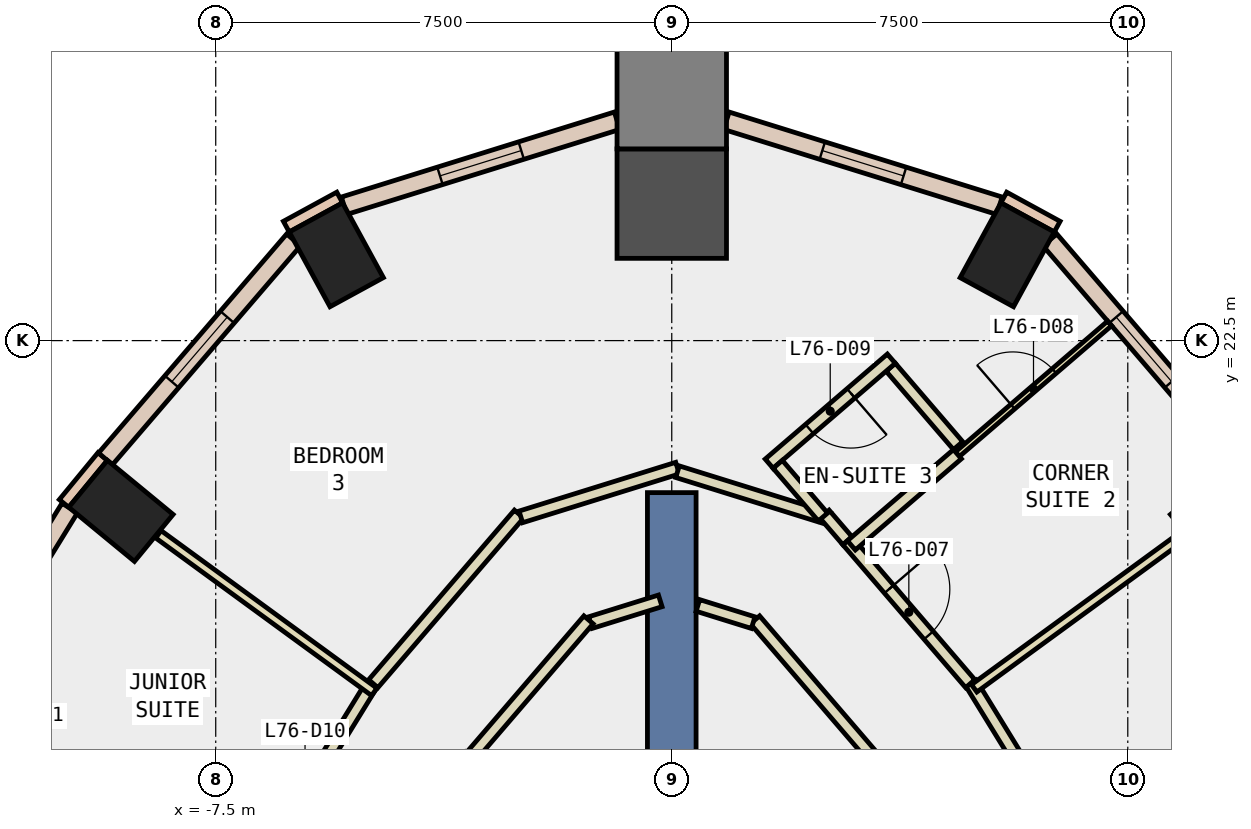
"""IFC4 building model, lengths in metres.
Left out: names, types, materials, properties, quantities, classifications, styles, units other than length and angle.
Written with IfcOpenShell. Run it as: python <this file> out.ifc"""

import sys

from ifc_helpers import new_model, si_unit, direction, frame, frame_2d, origin, origin_2d, place, context, subcontext, project, spatial, rectangle, extrude, element, fill, save


model = new_model("IFC4")
c1 = context("Model", 3, precision=1e-05, world=origin(), true_north=direction((0.0, 1.0)))
c2 = subcontext(c1, "Body", "Model", "MODEL_VIEW")
j1 = project(units=[si_unit("LENGTHUNIT", "METRE"), si_unit("PLANEANGLEUNIT", "RADIAN")], contexts=[c1])
p1 = place(None, origin())
s1 = spatial("IfcSite", under=j1, at=p1, CompositionType="ELEMENT")
p2 = place(p1, origin())
s2 = spatial("IfcBuilding", under=s1, at=p2, CompositionType="ELEMENT")
p3 = place(p2, frame((0.0, 0.0, 322.4)))
s3 = spatial("IfcBuildingStorey", under=s2, at=p3, CompositionType="ELEMENT", Elevation=322.4)
for number, where, z_axis, x_axis in (
    (1, (9.059, 19.7, -0.34), (0.0, 0.0, 1.0), (-0.636, 0.772, 0.0)),
    (2, (5.517, 23.911, -0.34), (0.0, 0.0, 1.0), (-0.878, 0.479, 0.0)),
):
    element("IfcColumn", number, at=place(p3, frame(where, z_axis=z_axis, x_axis=x_axis)), inside=s3, PredefinedType="COLUMN", context=c2, shape_type="SweptSolid", body=[
        extrude(rectangle(XDim=1.0, YDim=1.4, at=origin_2d()), origin(), (0.0, 0.0, 1.0), 3.34),
    ])
p4 = place(p3, frame((0.0, 24.753, -0.34), z_axis=(0.0, 0.0, 1.0), x_axis=(0.0, 1.0, 0.0)))
e3 = element("IfcColumn", 3, at=p4, inside=s3, PredefinedType="COLUMN", context=c2, shape_type="SweptSolid", body=[
    extrude(rectangle(XDim=1.8, YDim=1.8, at=origin_2d()), origin(), (0.0, 0.0, 1.0), 3.34),
])
for number, where, z_axis, x_axis in (
    (4, (-5.517, 23.911, -0.34), (0.0, 0.0, 1.0), (0.878, 0.479, 0.0)),
    (5, (-9.059, 19.7, -0.34), (0.0, 0.0, 1.0), (0.636, 0.772, 0.0)),
):
    element("IfcColumn", number, at=place(p3, frame(where, z_axis=z_axis, x_axis=x_axis)), inside=s3, PredefinedType="COLUMN", context=c2, shape_type="SweptSolid", body=[
        extrude(rectangle(XDim=1.0, YDim=1.4, at=origin_2d()), origin(), (0.0, 0.0, 1.0), 3.34),
    ])
p5 = place(p3, frame((0.0, 26.553, -0.34), z_axis=(0.0, 0.0, 1.0), x_axis=(0.0, 1.0, 0.0)))
e6 = element("IfcColumn", 6, at=p5, inside=s3, PredefinedType="COLUMN", context=c2, shape_type="SweptSolid", body=[
    extrude(rectangle(XDim=1.8, YDim=1.8, at=origin_2d()), origin(), (0.0, 0.0, 1.0), 3.34),
])
p6 = place(p3, frame((0.0, 11.0, -0.34), z_axis=(0.0, 0.0, 1.0), x_axis=(0.0, 1.0, 0.0)))
e7 = element("IfcWall", 7, at=p6, inside=s3, PredefinedType="SHEAR", context=c2, shape_type="SweptSolid", body=[
    extrude(rectangle(XDim=9.0, YDim=0.8, at=frame_2d((4.5, 0.0))), origin(), (0.0, 0.0, 1.0), 3.34),
])
for number, where, z_axis, x_axis in (
    (8, (6.339, 24.374, 0.0), (0.0, 0.0, 1.0), (-0.878, 0.479, 0.0)),
    (9, (-5.461, 24.853, 0.0), (0.0, 0.0, 1.0), (-0.878, -0.479, 0.0)),
    (10, (-9.359, 20.594, 0.0), (0.0, 0.0, 1.0), (-0.636, -0.772, 0.0)),
):
    element("IfcWall", number, at=place(p3, frame(where, z_axis=z_axis, x_axis=x_axis)), inside=s3, PredefinedType="STANDARD", context=c2, shape_type="SweptSolid", body=[
        extrude(rectangle(XDim=1.0, YDim=0.2, at=frame_2d((0.5, 0.0))), origin(), (0.0, 0.0, 1.0), 3.0),
    ])
p7 = place(p3, frame((9.313, 20.555, 0.0), z_axis=(0.0, 0.0, 1.0), x_axis=(-0.651684474108, 0.758490175419, 0.0)))
e11 = element("IfcWall", 11, at=p7, inside=s3, PredefinedType="STANDARD", context=c2, shape_type="SweptSolid", body=[
    extrude(rectangle(XDim=4.748, YDim=0.3, at=frame_2d((2.374, 0.0))), origin(), (0.0, 0.0, 1.0), 3.0),
])
p8 = place(p7, frame((1.674, 0.0, 0.9)))
e12 = element("IfcOpeningElement", 12, at=p8, cuts=e11, PredefinedType="OPENING", context=c2, shape_type="SweptSolid", body=[
    extrude(rectangle(XDim=1.4, YDim=2.0, at=frame_2d((0.7, 1.0))), frame((0.0, 0.16, 0.0), z_axis=(0.0, -1.0, 0.0), x_axis=(1.0, 0.0, 0.0)), (0.0, 0.0, 1.0), 0.32),
])
p9 = place(p3, frame((5.389, 24.718, 0.0), z_axis=(0.0, 0.0, 1.0), x_axis=(-0.954792612552, 0.297272714886, 0.0)))
e13 = element("IfcWall", 13, at=p9, inside=s3, PredefinedType="STANDARD", context=c2, shape_type="SweptSolid", body=[
    extrude(rectangle(XDim=4.703, YDim=0.3, at=frame_2d((2.351, 0.0))), origin(), (0.0, 0.0, 1.0), 3.0),
])
p10 = place(p9, frame((1.651, 0.0, 0.9)))
e14 = element("IfcOpeningElement", 14, at=p10, cuts=e13, PredefinedType="OPENING", context=c2, shape_type="SweptSolid", body=[
    extrude(rectangle(XDim=1.4, YDim=2.0, at=frame_2d((0.7, 1.0))), frame((0.0, 0.16, 0.0), z_axis=(0.0, -1.0, 0.0), x_axis=(1.0, 0.0, 0.0)), (0.0, 0.0, 1.0), 0.32),
])
p11 = place(p3, frame((-0.899, 26.116, 0.0), z_axis=(0.0, 0.0, 1.0), x_axis=(-0.954792612552, -0.297272714886, 0.0)))
e15 = element("IfcWall", 15, at=p11, inside=s3, PredefinedType="STANDARD", context=c2, shape_type="SweptSolid", body=[
    extrude(rectangle(XDim=4.703, YDim=0.3, at=frame_2d((2.351, 0.0))), origin(), (0.0, 0.0, 1.0), 3.0),
])
p12 = place(p11, frame((1.651, 0.0, 0.9)))
e16 = element("IfcOpeningElement", 16, at=p12, cuts=e15, PredefinedType="OPENING", context=c2, shape_type="SweptSolid", body=[
    extrude(rectangle(XDim=1.4, YDim=2.0, at=frame_2d((0.7, 1.0))), frame((0.0, 0.16, 0.0), z_axis=(0.0, -1.0, 0.0), x_axis=(1.0, 0.0, 0.0)), (0.0, 0.0, 1.0), 0.32),
])
p13 = place(p3, frame((-6.219, 24.156, 0.0), z_axis=(0.0, 0.0, 1.0), x_axis=(-0.651684474108, -0.758490175419, 0.0)))
e17 = element("IfcWall", 17, at=p13, inside=s3, PredefinedType="STANDARD", context=c2, shape_type="SweptSolid", body=[
    extrude(rectangle(XDim=4.748, YDim=0.3, at=frame_2d((2.374, 0.0))), origin(), (0.0, 0.0, 1.0), 3.0),
])
p14 = place(p13, frame((1.674, 0.0, 0.9)))
e18 = element("IfcOpeningElement", 18, at=p14, cuts=e17, PredefinedType="OPENING", context=c2, shape_type="SweptSolid", body=[
    extrude(rectangle(XDim=1.4, YDim=2.0, at=frame_2d((0.7, 1.0))), frame((0.0, 0.16, 0.0), z_axis=(0.0, -1.0, 0.0), x_axis=(1.0, 0.0, 0.0)), (0.0, 0.0, 1.0), 0.32),
])
p15 = place(p3, frame((-9.901, 19.747, 0.0), z_axis=(0.0, 0.0, 1.0), x_axis=(-0.524004608874, -0.851715427757, 0.0)))
e19 = element("IfcWall", 19, at=p15, inside=s3, PredefinedType="STANDARD", context=c2, shape_type="SweptSolid", body=[
    extrude(rectangle(XDim=7.485, YDim=0.3, at=frame_2d((3.742, 0.0))), origin(), (0.0, 0.0, 1.0), 3.0),
])
p16 = place(p15, frame((0.771, 0.0, 0.9)))
e20 = element("IfcOpeningElement", 20, at=p16, cuts=e19, PredefinedType="OPENING", context=c2, shape_type="SweptSolid", body=[
    extrude(rectangle(XDim=2.2, YDim=2.0, at=frame_2d((1.1, 1.0))), frame((0.0, 0.16, 0.0), z_axis=(0.0, -1.0, 0.0), x_axis=(1.0, 0.0, 0.0)), (0.0, 0.0, 1.0), 0.32),
])
p17 = place(p15, frame((4.514, 0.0, 0.9)))
e21 = element("IfcOpeningElement", 21, at=p17, cuts=e19, PredefinedType="OPENING", context=c2, shape_type="SweptSolid", body=[
    extrude(rectangle(XDim=2.2, YDim=2.0, at=frame_2d((1.1, 1.0))), frame((0.0, 0.16, 0.0), z_axis=(0.0, -1.0, 0.0), x_axis=(1.0, 0.0, 0.0)), (0.0, 0.0, 1.0), 0.32),
])
p18 = place(p3, frame((3.289, 15.674, 0.0), z_axis=(0.0, 0.0, 1.0), x_axis=(-0.651848676423, 0.758349064116, 0.0)))
e22 = element("IfcWall", 22, at=p18, inside=s3, PredefinedType="PARTITIONING", context=c2, shape_type="SweptSolid", body=[
    extrude(rectangle(XDim=2.946, YDim=0.2, at=frame_2d((1.473, 0.0))), origin(), (0.0, 0.0, 1.0), 3.0),
])
p19 = place(p3, frame((1.339, 17.862, 0.0), z_axis=(0.0, 0.0, 1.0), x_axis=(-0.954826063502, 0.297165254457, 0.0)))
e23 = element("IfcWall", 23, at=p19, inside=s3, PredefinedType="PARTITIONING", context=c2, shape_type="SweptSolid", body=[
    extrude(rectangle(XDim=0.952, YDim=0.2, at=frame_2d((0.476, 0.0))), origin(), (0.0, 0.0, 1.0), 3.0),
])
p20 = place(p3, frame((-0.189, 18.22, 0.0), z_axis=(0.0, 0.0, 1.0), x_axis=(-0.954836332451, -0.297132257137, 0.0)))
e24 = element("IfcWall", 24, at=p20, inside=s3, PredefinedType="PARTITIONING", context=c2, shape_type="SweptSolid", body=[
    extrude(rectangle(XDim=1.205, YDim=0.2, at=frame_2d((0.602, 0.0))), origin(), (0.0, 0.0, 1.0), 3.0),
])
p21 = place(p3, frame((-1.369, 17.908, 0.0), z_axis=(0.0, 0.0, 1.0), x_axis=(-0.651848676423, -0.758349064116, 0.0)))
e25 = element("IfcWall", 25, at=p21, inside=s3, PredefinedType="PARTITIONING", context=c2, shape_type="SweptSolid", body=[
    extrude(rectangle(XDim=2.946, YDim=0.2, at=frame_2d((1.473, 0.0))), origin(), (0.0, 0.0, 1.0), 3.0),
])
p22 = place(p3, frame((4.922, 16.867, 0.0), z_axis=(0.0, 0.0, 1.0), x_axis=(0.523943621984, -0.851752945978, 0.0)))
e26 = element("IfcWall", 26, at=p22, inside=s3, PredefinedType="PARTITIONING", context=c2, shape_type="SweptSolid", body=[
    extrude(rectangle(XDim=8.06, YDim=0.2, at=frame_2d((4.03, 0.0))), origin(), (0.0, 0.0, 1.0), 3.0),
])
p23 = place(p3, frame((2.889, 19.209, 0.0), z_axis=(0.0, 0.0, 1.0), x_axis=(0.651686040861, -0.758488829283, 0.0)))
e27 = element("IfcWall", 27, at=p23, inside=s3, PredefinedType="PARTITIONING", context=c2, shape_type="SweptSolid", body=[
    extrude(rectangle(XDim=3.1, YDim=0.2, at=frame_2d((1.55, 0.0))), origin(), (0.0, 0.0, 1.0), 3.0),
])
p24 = place(p23, frame((1.05, 0.0, 0.0)))
e28 = element("IfcOpeningElement", 28, at=p24, cuts=e27, PredefinedType="OPENING", context=c2, shape_type="SweptSolid", body=[
    extrude(rectangle(XDim=1.0, YDim=2.1, at=frame_2d((0.5, 1.05))), frame((0.0, 0.11, 0.0), z_axis=(0.0, -1.0, 0.0), x_axis=(1.0, 0.0, 0.0)), (0.0, 0.0, 1.0), 0.22),
])
p25 = place(p3, frame((-4.909, 16.858, 0.0), z_axis=(0.0, 0.0, 1.0), x_axis=(0.651785835936, 0.758403074937, 0.0)))
e29 = element("IfcWall", 29, at=p25, inside=s3, PredefinedType="PARTITIONING", context=c2, shape_type="SweptSolid", body=[
    extrude(rectangle(XDim=3.677, YDim=0.2, at=frame_2d((1.839, 0.0))), origin(), (0.0, 0.0, 1.0), 3.0),
])
p26 = place(p3, frame((-2.482, 19.601, 0.0), z_axis=(0.0, 0.0, 1.0), x_axis=(0.95482540871, 0.297167358372, 0.0)))
e30 = element("IfcWall", 30, at=p26, inside=s3, PredefinedType="PARTITIONING", context=c2, shape_type="SweptSolid", body=[
    extrude(rectangle(XDim=2.699, YDim=0.2, at=frame_2d((1.349, 0.0))), origin(), (0.0, 0.0, 1.0), 3.0),
])
p27 = place(p3, frame((0.095, 20.344, 0.0), z_axis=(0.0, 0.0, 1.0), x_axis=(0.954837867825, -0.297127323158, 0.0)))
e31 = element("IfcWall", 31, at=p27, inside=s3, PredefinedType="PARTITIONING", context=c2, shape_type="SweptSolid", body=[
    extrude(rectangle(XDim=2.605, YDim=0.2, at=frame_2d((1.302, 0.0))), origin(), (0.0, 0.0, 1.0), 3.0),
])
p28 = place(p3, frame((2.512, 19.647, 0.0), z_axis=(0.0, 0.0, 1.0), x_axis=(0.652320947019, -0.757942862016, 0.0)))
e32 = element("IfcWall", 32, at=p28, inside=s3, PredefinedType="PARTITIONING", context=c2, shape_type="SweptSolid", body=[
    extrude(rectangle(XDim=0.578, YDim=0.2, at=frame_2d((0.289, 0.0))), origin(), (0.0, 0.0, 1.0), 3.0),
])
p29 = place(p3, frame((-7.101, 13.324, 0.0), z_axis=(0.0, 0.0, 1.0), x_axis=(0.52395735307, 0.851744499344, 0.0)))
e33 = element("IfcWall", 33, at=p29, inside=s3, PredefinedType="PARTITIONING", context=c2, shape_type="SweptSolid", body=[
    extrude(rectangle(XDim=4.084, YDim=0.2, at=frame_2d((2.042, 0.0))), origin(), (0.0, 0.0, 1.0), 3.0),
])
p30 = place(p29, frame((1.542, 0.0, 0.0)))
e34 = element("IfcOpeningElement", 34, at=p30, cuts=e33, PredefinedType="OPENING", context=c2, shape_type="SweptSolid", body=[
    extrude(rectangle(XDim=1.0, YDim=2.1, at=frame_2d((0.5, 1.05))), frame((0.0, 0.11, 0.0), z_axis=(0.0, -1.0, 0.0), x_axis=(1.0, 0.0, 0.0)), (0.0, 0.0, 1.0), 0.22),
])
p31 = place(p3, frame((4.974, 16.782, 0.0), z_axis=(0.0, 0.0, 1.0), x_axis=(0.807621211013, 0.589701602102, 0.0)))
e35 = element("IfcWall", 35, at=p31, inside=s3, PredefinedType="PARTITIONING", context=c2, shape_type="SweptSolid", body=[
    extrude(rectangle(XDim=4.295, YDim=0.15, at=frame_2d((2.148, 0.0))), origin(), (0.0, 0.0, 1.0), 3.0),
])
p32 = place(p3, frame((4.698, 20.632, 0.0), z_axis=(0.0, 0.0, 1.0), x_axis=(0.75843091069, 0.651753445491, 0.0)))
e36 = element("IfcWall", 36, at=p32, inside=s3, PredefinedType="PARTITIONING", context=c2, shape_type="SweptSolid", body=[
    extrude(rectangle(XDim=3.3, YDim=0.1, at=frame_2d((1.65, 0.0))), origin(), (0.0, 0.0, 1.0), 3.0),
])
p33 = place(p32, frame((1.2, 0.0, 0.0)))
e37 = element("IfcOpeningElement", 37, at=p33, cuts=e36, PredefinedType="OPENING", context=c2, shape_type="SweptSolid", body=[
    extrude(rectangle(XDim=0.9, YDim=2.1, at=frame_2d((0.45, 1.05))), frame((0.0, 0.06, 0.0), z_axis=(0.0, -1.0, 0.0), x_axis=(1.0, 0.0, 0.0)), (0.0, 0.0, 1.0), 0.12),
])
p34 = place(p3, frame((2.954, 19.133, 0.0), z_axis=(0.0, 0.0, 1.0), x_axis=(0.758341579104, 0.65185738425, 0.0)))
e38 = element("IfcWall", 38, at=p34, inside=s3, PredefinedType="PARTITIONING", context=c2, shape_type="SweptSolid", body=[
    extrude(rectangle(XDim=2.3, YDim=0.2, at=frame_2d((1.15, 0.0))), origin(), (0.0, 0.0, 1.0), 3.0),
])
p35 = place(p3, frame((4.709, 20.773, 0.0), z_axis=(0.0, 0.0, 1.0), x_axis=(-0.651808051275, 0.758383982092, 0.0)))
e39 = element("IfcWall", 39, at=p35, inside=s3, PredefinedType="PARTITIONING", context=c2, shape_type="SweptSolid", body=[
    extrude(rectangle(XDim=1.7, YDim=0.2, at=frame_2d((0.85, 0.0))), origin(), (0.0, 0.0, 1.0), 3.0),
])
p36 = place(p3, frame((3.611, 22.203, 0.0), z_axis=(0.0, 0.0, 1.0), x_axis=(-0.75836467248, -0.651830517493, 0.0)))
e40 = element("IfcWall", 40, at=p36, inside=s3, PredefinedType="PARTITIONING", context=c2, shape_type="SweptSolid", body=[
    extrude(rectangle(XDim=2.649, YDim=0.2, at=frame_2d((1.325, 0.0))), origin(), (0.0, 0.0, 1.0), 3.0),
])
p37 = place(p36, frame((0.875, 0.0, 0.0)))
e41 = element("IfcOpeningElement", 41, at=p37, cuts=e40, PredefinedType="OPENING", context=c2, shape_type="SweptSolid", body=[
    extrude(rectangle(XDim=0.9, YDim=2.1, at=frame_2d((0.45, 1.05))), frame((0.0, 0.11, 0.0), z_axis=(0.0, -1.0, 0.0), x_axis=(1.0, 0.0, 0.0)), (0.0, 0.0, 1.0), 0.22),
])
p38 = place(p3, frame((1.743, 20.465, 0.0), z_axis=(0.0, 0.0, 1.0), x_axis=(0.65174176003, -0.758440952371, 0.0)))
e42 = element("IfcWall", 42, at=p38, inside=s3, PredefinedType="PARTITIONING", context=c2, shape_type="SweptSolid", body=[
    extrude(rectangle(XDim=1.142, YDim=0.2, at=frame_2d((0.571, 0.0))), origin(), (0.0, 0.0, 1.0), 3.0),
])
p39 = place(p3, frame((-4.893, 16.723, 0.0), z_axis=(0.0, 0.0, 1.0), x_axis=(-0.807632235509, 0.589686503294, 0.0)))
e43 = element("IfcWall", 43, at=p39, inside=s3, PredefinedType="PARTITIONING", context=c2, shape_type="SweptSolid", body=[
    extrude(rectangle(XDim=4.396, YDim=0.15, at=frame_2d((2.198, 0.0))), origin(), (0.0, 0.0, 1.0), 3.0),
])
p40 = place(p3, frame((-9.519, 14.929, 0.0), z_axis=(0.0, 0.0, 1.0), x_axis=(-0.851621054013, 0.524157972715, 0.0)))
e44 = element("IfcWall", 44, at=p40, inside=s3, PredefinedType="PARTITIONING", context=c2, shape_type="SweptSolid", body=[
    extrude(rectangle(XDim=2.7, YDim=0.1, at=frame_2d((1.35, 0.0))), origin(), (0.0, 0.0, 1.0), 3.0),
])
p41 = place(p40, frame((0.9, 0.0, 0.0)))
e45 = element("IfcOpeningElement", 45, at=p41, cuts=e44, PredefinedType="OPENING", context=c2, shape_type="SweptSolid", body=[
    extrude(rectangle(XDim=0.9, YDim=2.1, at=frame_2d((0.45, 1.05))), frame((0.0, 0.06, 0.0), z_axis=(0.0, -1.0, 0.0), x_axis=(1.0, 0.0, 0.0)), (0.0, 0.0, 1.0), 0.12),
])
p42 = place(p8, origin())
e46 = element("IfcWindow", 46, at=p42, inside=s3, PartitioningType="SINGLE_PANEL", PredefinedType="WINDOW", context=c2, shape_type="SweptSolid", body=[
    extrude(rectangle(XDim=1.4, YDim=2.0, at=frame_2d((0.7, 1.0))), frame((0.0, 0.03, 0.0), z_axis=(0.0, -1.0, 0.0), x_axis=(1.0, 0.0, 0.0)), (0.0, 0.0, 1.0), 0.06),
])
fill(e12, e46)
p43 = place(p10, origin())
e47 = element("IfcWindow", 47, at=p43, inside=s3, PartitioningType="SINGLE_PANEL", PredefinedType="WINDOW", context=c2, shape_type="SweptSolid", body=[
    extrude(rectangle(XDim=1.4, YDim=2.0, at=frame_2d((0.7, 1.0))), frame((0.0, 0.03, 0.0), z_axis=(0.0, -1.0, 0.0), x_axis=(1.0, 0.0, 0.0)), (0.0, 0.0, 1.0), 0.06),
])
fill(e14, e47)
p44 = place(p12, origin())
e48 = element("IfcWindow", 48, at=p44, inside=s3, PartitioningType="SINGLE_PANEL", PredefinedType="WINDOW", context=c2, shape_type="SweptSolid", body=[
    extrude(rectangle(XDim=1.4, YDim=2.0, at=frame_2d((0.7, 1.0))), frame((0.0, 0.03, 0.0), z_axis=(0.0, -1.0, 0.0), x_axis=(1.0, 0.0, 0.0)), (0.0, 0.0, 1.0), 0.06),
])
fill(e16, e48)
p45 = place(p14, origin())
e49 = element("IfcWindow", 49, at=p45, inside=s3, PartitioningType="SINGLE_PANEL", PredefinedType="WINDOW", context=c2, shape_type="SweptSolid", body=[
    extrude(rectangle(XDim=1.4, YDim=2.0, at=frame_2d((0.7, 1.0))), frame((0.0, 0.03, 0.0), z_axis=(0.0, -1.0, 0.0), x_axis=(1.0, 0.0, 0.0)), (0.0, 0.0, 1.0), 0.06),
])
fill(e18, e49)
p46 = place(p24, origin())
e50 = element("IfcDoor", 50, at=p46, inside=s3, OperationType="SINGLE_SWING_LEFT", PredefinedType="DOOR", context=c2, shape_type="SweptSolid", body=[
    extrude(rectangle(XDim=1.0, YDim=2.1, at=frame_2d((0.5, 1.05))), frame((0.0, 0.025, 0.0), z_axis=(0.0, -1.0, 0.0), x_axis=(1.0, 0.0, 0.0)), (0.0, 0.0, 1.0), 0.05),
])
fill(e28, e50)
p47 = place(p33, origin())
e51 = element("IfcDoor", 51, at=p47, inside=s3, OperationType="SINGLE_SWING_RIGHT", PredefinedType="DOOR", context=c2, shape_type="SweptSolid", body=[
    extrude(rectangle(XDim=0.9, YDim=2.1, at=frame_2d((0.45, 1.05))), frame((0.0, 0.025, 0.0), z_axis=(0.0, -1.0, 0.0), x_axis=(1.0, 0.0, 0.0)), (0.0, 0.0, 1.0), 0.05),
])
fill(e37, e51)
p48 = place(p37, origin())
e52 = element("IfcDoor", 52, at=p48, inside=s3, OperationType="SINGLE_SWING_LEFT", PredefinedType="DOOR", context=c2, shape_type="SweptSolid", body=[
    extrude(rectangle(XDim=0.9, YDim=2.1, at=frame_2d((0.45, 1.05))), frame((0.0, 0.025, 0.0), z_axis=(0.0, -1.0, 0.0), x_axis=(1.0, 0.0, 0.0)), (0.0, 0.0, 1.0), 0.05),
])
fill(e41, e52)
save(model, sys.argv[1])
